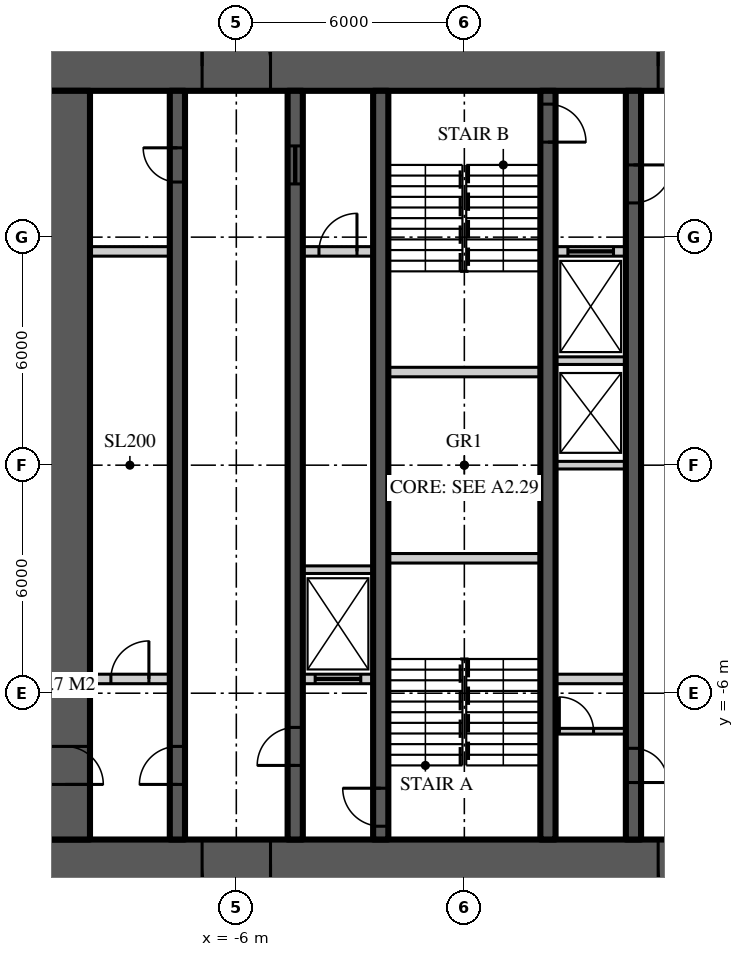
"""IFC4 building model, lengths in metres.
Left out: names, types, materials, properties, quantities, classifications, styles, units other than length and angle.
Written with IfcOpenShell. Run it as: python <this file> out.ifc"""

import sys

from ifc_helpers import new_model, si_unit, direction, frame, frame_2d, origin, place, context, subcontext, project, spatial, rectangle, extrude, element, fill, save


model = new_model("IFC4")
c1 = context("Model", 3, precision=1e-05, world=origin(), true_north=direction((0.0, 1.0)))
c2 = subcontext(c1, "Body", "Model", "MODEL_VIEW")
j1 = project(units=[si_unit("LENGTHUNIT", "METRE"), si_unit("PLANEANGLEUNIT", "RADIAN")], contexts=[c1])
p1 = place(None, origin())
s1 = spatial("IfcSite", under=j1, at=p1, CompositionType="ELEMENT")
p2 = place(p1, origin())
s2 = spatial("IfcBuilding", under=s1, at=p2, CompositionType="ELEMENT")
p3 = place(p2, frame((0.0, 0.0, 212.7)))
s3 = spatial("IfcBuildingStorey", under=s2, at=p3, CompositionType="ELEMENT", Elevation=212.7)
p4 = place(p3, frame((-11.15, 10.5, 0.0), z_axis=(0.0, 0.0, 1.0), x_axis=(1.0, 0.0, 0.0)))
e1 = element("IfcWall", 1, at=p4, inside=s3, PredefinedType="SHEAR", context=c2, shape_type="SweptSolid", body=[
    extrude(rectangle(XDim=22.3, YDim=1.3, at=frame_2d((11.15, 0.0))), origin(), (0.0, 0.0, 1.0), 3.9),
])
p5 = place(p4, frame((4.25, 0.0, 0.0)))
e2 = element("IfcOpeningElement", 2, at=p5, cuts=e1, PredefinedType="OPENING", context=c2, shape_type="SweptSolid", body=[
    extrude(rectangle(XDim=1.8, YDim=2.2, at=frame_2d((0.9, 1.1))), frame((0.0, 0.66, 0.0), z_axis=(0.0, -1.0, 0.0), x_axis=(1.0, 0.0, 0.0)), (0.0, 0.0, 1.0), 1.32),
])
p6 = place(p4, frame((16.25, 0.0, 0.0)))
e3 = element("IfcOpeningElement", 3, at=p6, cuts=e1, PredefinedType="OPENING", context=c2, shape_type="SweptSolid", body=[
    extrude(rectangle(XDim=1.8, YDim=2.2, at=frame_2d((0.9, 1.1))), frame((0.0, 0.66, 0.0), z_axis=(0.0, -1.0, 0.0), x_axis=(1.0, 0.0, 0.0)), (0.0, 0.0, 1.0), 1.32),
])
p7 = place(p3, frame((11.15, -10.5, 0.0), z_axis=(0.0, 0.0, 1.0), x_axis=(-1.0, 0.0, 0.0)))
e4 = element("IfcWall", 4, at=p7, inside=s3, PredefinedType="SHEAR", context=c2, shape_type="SweptSolid", body=[
    extrude(rectangle(XDim=22.3, YDim=1.3, at=frame_2d((11.15, 0.0))), origin(), (0.0, 0.0, 1.0), 3.9),
])
p8 = place(p7, frame((16.25, 0.0, 0.0)))
e5 = element("IfcOpeningElement", 5, at=p8, cuts=e4, PredefinedType="OPENING", context=c2, shape_type="SweptSolid", body=[
    extrude(rectangle(XDim=1.8, YDim=2.2, at=frame_2d((0.9, 1.1))), frame((0.0, 0.66, 0.0), z_axis=(0.0, -1.0, 0.0), x_axis=(1.0, 0.0, 0.0)), (0.0, 0.0, 1.0), 1.32),
])
p9 = place(p7, frame((4.25, 0.0, 0.0)))
e6 = element("IfcOpeningElement", 6, at=p9, cuts=e4, PredefinedType="OPENING", context=c2, shape_type="SweptSolid", body=[
    extrude(rectangle(XDim=1.8, YDim=2.2, at=frame_2d((0.9, 1.1))), frame((0.0, 0.66, 0.0), z_axis=(0.0, -1.0, 0.0), x_axis=(1.0, 0.0, 0.0)), (0.0, 0.0, 1.0), 1.32),
])
p10 = place(p3, frame((-10.5, 9.85, 0.0), z_axis=(0.0, 0.0, 1.0), x_axis=(0.0, -1.0, 0.0)))
e7 = element("IfcWall", 7, at=p10, inside=s3, PredefinedType="SHEAR", context=c2, shape_type="SweptSolid", body=[
    extrude(rectangle(XDim=19.7, YDim=1.3, at=frame_2d((9.85, 0.0))), origin(), (0.0, 0.0, 1.0), 3.9),
])
p11 = place(p10, frame((17.25, 0.0, 0.0)))
e8 = element("IfcOpeningElement", 8, at=p11, cuts=e7, PredefinedType="OPENING", context=c2, shape_type="SweptSolid", body=[
    extrude(rectangle(XDim=1.0, YDim=2.2, at=frame_2d((0.5, 1.1))), frame((0.0, 0.66, 0.0), z_axis=(0.0, -1.0, 0.0), x_axis=(1.0, 0.0, 0.0)), (0.0, 0.0, 1.0), 1.32),
])
p12 = place(p3, frame((-7.55, -9.85, 0.0), z_axis=(0.0, 0.0, 1.0), x_axis=(0.0, 1.0, 0.0)))
e9 = element("IfcWall", 9, at=p12, inside=s3, PredefinedType="SHEAR", context=c2, shape_type="SweptSolid", body=[
    extrude(rectangle(XDim=19.7, YDim=0.4, at=frame_2d((9.85, 0.0))), origin(), (0.0, 0.0, 1.0), 3.9),
])
p13 = place(p12, frame((1.45, 0.0, 0.0)))
e10 = element("IfcOpeningElement", 10, at=p13, cuts=e9, PredefinedType="OPENING", context=c2, shape_type="SweptSolid", body=[
    extrude(rectangle(XDim=1.0, YDim=2.2, at=frame_2d((0.5, 1.1))), frame((0.0, 0.21, 0.0), z_axis=(0.0, -1.0, 0.0), x_axis=(1.0, 0.0, 0.0)), (0.0, 0.0, 1.0), 0.42),
])
p14 = place(p12, frame((17.3, 0.0, 0.0)))
e11 = element("IfcOpeningElement", 11, at=p14, cuts=e9, PredefinedType="OPENING", context=c2, shape_type="SweptSolid", body=[
    extrude(rectangle(XDim=0.9, YDim=2.1, at=frame_2d((0.45, 1.05))), frame((0.0, 0.21, 0.0), z_axis=(0.0, -1.0, 0.0), x_axis=(1.0, 0.0, 0.0)), (0.0, 0.0, 1.0), 0.42),
])
p15 = place(p3, frame((-4.45, -9.85, 0.0), z_axis=(0.0, 0.0, 1.0), x_axis=(0.0, 1.0, 0.0)))
e12 = element("IfcWall", 12, at=p15, inside=s3, PredefinedType="SHEAR", context=c2, shape_type="SweptSolid", body=[
    extrude(rectangle(XDim=19.7, YDim=0.4, at=frame_2d((9.85, 0.0))), origin(), (0.0, 0.0, 1.0), 3.9),
])
p16 = place(p15, frame((1.95, 0.0, 0.0)))
e13 = element("IfcOpeningElement", 13, at=p16, cuts=e12, PredefinedType="OPENING", context=c2, shape_type="SweptSolid", body=[
    extrude(rectangle(XDim=1.0, YDim=2.2, at=frame_2d((0.5, 1.1))), frame((0.0, 0.21, 0.0), z_axis=(0.0, -1.0, 0.0), x_axis=(1.0, 0.0, 0.0)), (0.0, 0.0, 1.0), 0.42),
])
p17 = place(p15, frame((17.25, 0.0, 0.0)))
e14 = element("IfcOpeningElement", 14, at=p17, cuts=e12, PredefinedType="OPENING", context=c2, shape_type="SweptSolid", body=[
    extrude(rectangle(XDim=1.0, YDim=2.1, at=frame_2d((0.5, 1.05))), frame((0.0, 0.21, 0.0), z_axis=(0.0, -1.0, 0.0), x_axis=(1.0, 0.0, 0.0)), (0.0, 0.0, 1.0), 0.42),
])
p18 = place(p3, frame((4.45, 9.85, 0.0), z_axis=(0.0, 0.0, 1.0), x_axis=(0.0, -1.0, 0.0)))
e15 = element("IfcWall", 15, at=p18, inside=s3, PredefinedType="SHEAR", context=c2, shape_type="SweptSolid", body=[
    extrude(rectangle(XDim=19.7, YDim=0.4, at=frame_2d((9.85, 0.0))), origin(), (0.0, 0.0, 1.0), 3.9),
])
p19 = place(p18, frame((1.95, 0.0, 0.0)))
e16 = element("IfcOpeningElement", 16, at=p19, cuts=e15, PredefinedType="OPENING", context=c2, shape_type="SweptSolid", body=[
    extrude(rectangle(XDim=1.0, YDim=2.2, at=frame_2d((0.5, 1.1))), frame((0.0, 0.21, 0.0), z_axis=(0.0, -1.0, 0.0), x_axis=(1.0, 0.0, 0.0)), (0.0, 0.0, 1.0), 0.42),
])
p20 = place(p18, frame((17.3, 0.0, 0.0)))
e17 = element("IfcOpeningElement", 17, at=p20, cuts=e15, PredefinedType="OPENING", context=c2, shape_type="SweptSolid", body=[
    extrude(rectangle(XDim=0.9, YDim=2.1, at=frame_2d((0.45, 1.05))), frame((0.0, 0.21, 0.0), z_axis=(0.0, -1.0, 0.0), x_axis=(1.0, 0.0, 0.0)), (0.0, 0.0, 1.0), 0.42),
])
p21 = place(p3, frame((-2.2, -9.85, 0.0), z_axis=(0.0, 0.0, 1.0), x_axis=(0.0, 1.0, 0.0)))
e18 = element("IfcWall", 18, at=p21, inside=s3, PredefinedType="SHEAR", context=c2, shape_type="SweptSolid", body=[
    extrude(rectangle(XDim=19.7, YDim=0.4, at=frame_2d((9.85, 0.0))), origin(), (0.0, 0.0, 1.0), 3.9),
])
p22 = place(p21, frame((0.35, 0.0, 0.0)))
e19 = element("IfcOpeningElement", 19, at=p22, cuts=e18, PredefinedType="OPENING", context=c2, shape_type="SweptSolid", body=[
    extrude(rectangle(XDim=1.0, YDim=2.2, at=frame_2d((0.5, 1.1))), frame((0.0, 0.21, 0.0), z_axis=(0.0, -1.0, 0.0), x_axis=(1.0, 0.0, 0.0)), (0.0, 0.0, 1.0), 0.42),
])
p23 = place(p3, frame((2.2, 9.85, 0.0), z_axis=(0.0, 0.0, 1.0), x_axis=(0.0, -1.0, 0.0)))
e20 = element("IfcWall", 20, at=p23, inside=s3, PredefinedType="SHEAR", context=c2, shape_type="SweptSolid", body=[
    extrude(rectangle(XDim=19.7, YDim=0.4, at=frame_2d((9.85, 0.0))), origin(), (0.0, 0.0, 1.0), 3.9),
])
p24 = place(p23, frame((0.35, 0.0, 0.0)))
e21 = element("IfcOpeningElement", 21, at=p24, cuts=e20, PredefinedType="OPENING", context=c2, shape_type="SweptSolid", body=[
    extrude(rectangle(XDim=1.0, YDim=2.2, at=frame_2d((0.5, 1.1))), frame((0.0, 0.21, 0.0), z_axis=(0.0, -1.0, 0.0), x_axis=(1.0, 0.0, 0.0)), (0.0, 0.0, 1.0), 0.42),
])
p25 = place(p3, frame((-9.85, 5.625, 0.0), z_axis=(0.0, 0.0, 1.0), x_axis=(1.0, 0.0, 0.0)))
e22 = element("IfcWall", 22, at=p25, inside=s3, PredefinedType="SOLIDWALL", context=c2, shape_type="SweptSolid", body=[
    extrude(rectangle(XDim=2.1, YDim=0.25, at=frame_2d((1.05, 0.0))), origin(), (0.0, 0.0, 1.0), 3.7),
])
p26 = place(p3, frame((-4.25, 5.625, 0.0), z_axis=(0.0, 0.0, 1.0), x_axis=(1.0, 0.0, 0.0)))
e23 = element("IfcWall", 23, at=p26, inside=s3, PredefinedType="SOLIDWALL", context=c2, shape_type="SweptSolid", body=[
    extrude(rectangle(XDim=1.85, YDim=0.25, at=frame_2d((0.925, 0.0))), origin(), (0.0, 0.0, 1.0), 3.7),
])
p27 = place(p26, frame((0.425, 0.0, 0.0)))
e24 = element("IfcOpeningElement", 24, at=p27, cuts=e23, PredefinedType="OPENING", context=c2, shape_type="SweptSolid", body=[
    extrude(rectangle(XDim=1.0, YDim=2.2, at=frame_2d((0.5, 1.1))), frame((0.0, 0.135, 0.0), z_axis=(0.0, -1.0, 0.0), x_axis=(1.0, 0.0, 0.0)), (0.0, 0.0, 1.0), 0.27),
])
p28 = place(p3, frame((2.4, 5.625, 0.0), z_axis=(0.0, 0.0, 1.0), x_axis=(1.0, 0.0, 0.0)))
e25 = element("IfcWall", 25, at=p28, inside=s3, PredefinedType="SOLIDWALL", context=c2, shape_type="SweptSolid", body=[
    extrude(rectangle(XDim=1.85, YDim=0.25, at=frame_2d((0.925, 0.0))), origin(), (0.0, 0.0, 1.0), 3.7),
])
p29 = place(p28, frame((0.325, 0.0, 0.0)))
e26 = element("IfcOpeningElement", 26, at=p29, cuts=e25, PredefinedType="OPENING", context=c2, shape_type="SweptSolid", body=[
    extrude(rectangle(XDim=1.2, YDim=2.2, at=frame_2d((0.6, 1.1))), frame((0.0, 0.135, 0.0), z_axis=(0.0, -1.0, 0.0), x_axis=(1.0, 0.0, 0.0)), (0.0, 0.0, 1.0), 0.27),
])
p30 = place(p3, frame((-9.85, -5.625, 0.0), z_axis=(0.0, 0.0, 1.0), x_axis=(1.0, 0.0, 0.0)))
e27 = element("IfcWall", 27, at=p30, inside=s3, PredefinedType="SOLIDWALL", context=c2, shape_type="SweptSolid", body=[
    extrude(rectangle(XDim=2.1, YDim=0.25, at=frame_2d((1.05, 0.0))), origin(), (0.0, 0.0, 1.0), 3.7),
])
p31 = place(p30, frame((0.55, 0.0, 0.0)))
e28 = element("IfcOpeningElement", 28, at=p31, cuts=e27, PredefinedType="OPENING", context=c2, shape_type="SweptSolid", body=[
    extrude(rectangle(XDim=1.0, YDim=2.2, at=frame_2d((0.5, 1.1))), frame((0.0, 0.135, 0.0), z_axis=(0.0, -1.0, 0.0), x_axis=(1.0, 0.0, 0.0)), (0.0, 0.0, 1.0), 0.27),
])
p32 = place(p3, frame((-4.25, -5.625, 0.0), z_axis=(0.0, 0.0, 1.0), x_axis=(1.0, 0.0, 0.0)))
e29 = element("IfcWall", 29, at=p32, inside=s3, PredefinedType="SOLIDWALL", context=c2, shape_type="SweptSolid", body=[
    extrude(rectangle(XDim=1.85, YDim=0.25, at=frame_2d((0.925, 0.0))), origin(), (0.0, 0.0, 1.0), 3.7),
])
p33 = place(p32, frame((0.325, 0.0, 0.0)))
e30 = element("IfcOpeningElement", 30, at=p33, cuts=e29, PredefinedType="OPENING", context=c2, shape_type="SweptSolid", body=[
    extrude(rectangle(XDim=1.2, YDim=2.2, at=frame_2d((0.6, 1.1))), frame((0.0, 0.135, 0.0), z_axis=(0.0, -1.0, 0.0), x_axis=(1.0, 0.0, 0.0)), (0.0, 0.0, 1.0), 0.27),
])
p34 = place(p3, frame((2.4, -5.625, 0.0), z_axis=(0.0, 0.0, 1.0), x_axis=(1.0, 0.0, 0.0)))
e31 = element("IfcWall", 31, at=p34, inside=s3, PredefinedType="SOLIDWALL", context=c2, shape_type="SweptSolid", body=[
    extrude(rectangle(XDim=1.85, YDim=0.25, at=frame_2d((0.925, 0.0))), origin(), (0.0, 0.0, 1.0), 3.7),
])
for number, where, z_axis, x_axis in (
    (32, (-2.0, -2.45, 0.0), (0.0, 0.0, 1.0), (1.0, 0.0, 0.0)),
    (33, (-2.0, 2.45, 0.0), (0.0, 0.0, 1.0), (1.0, 0.0, 0.0)),
):
    element("IfcWall", number, at=place(p3, frame(where, z_axis=z_axis, x_axis=x_axis)), inside=s3, PredefinedType="SOLIDWALL", context=c2, shape_type="SweptSolid", body=[
        extrude(rectangle(XDim=4.0, YDim=0.25, at=frame_2d((2.0, 0.0))), origin(), (0.0, 0.0, 1.0), 3.7),
    ])
for number, where, z_axis, x_axis in (
    (34, (-4.25, -2.75, 0.0), (0.0, 0.0, 1.0), (1.0, 0.0, 0.0)),
    (35, (2.4, 0.0, 0.0), (0.0, 0.0, 1.0), (1.0, 0.0, 0.0)),
    (36, (2.4, 2.75, 0.0), (0.0, 0.0, 1.0), (1.0, 0.0, 0.0)),
):
    element("IfcWall", number, at=place(p3, frame(where, z_axis=z_axis, x_axis=x_axis)), inside=s3, PredefinedType="SOLIDWALL", context=c2, shape_type="SweptSolid", body=[
        extrude(rectangle(XDim=1.85, YDim=0.2, at=frame_2d((0.925, 0.0))), origin(), (0.0, 0.0, 1.0), 3.7),
    ])
p35 = place(p3, frame((2.4, -7.0, 0.0), z_axis=(0.0, 0.0, 1.0), x_axis=(1.0, 0.0, 0.0)))
e37 = element("IfcWall", 37, at=p35, inside=s3, PredefinedType="SOLIDWALL", context=c2, shape_type="SweptSolid", body=[
    extrude(rectangle(XDim=1.85, YDim=0.15, at=frame_2d((0.925, 0.0))), origin(), (0.0, 0.0, 1.0), 3.77),
])
p36 = place(p35, frame((0.1, 0.0, 0.0)))
e38 = element("IfcOpeningElement", 38, at=p36, cuts=e37, PredefinedType="OPENING", context=c2, shape_type="SweptSolid", body=[
    extrude(rectangle(XDim=0.9, YDim=2.1, at=frame_2d((0.45, 1.05))), frame((0.0, 0.085, 0.0), z_axis=(0.0, -1.0, 0.0), x_axis=(1.0, 0.0, 0.0)), (0.0, 0.0, 1.0), 0.17),
])
p37 = place(p5, origin())
e39 = element("IfcDoor", 39, at=p37, inside=s3, OperationType="DOUBLE_DOOR_DOUBLE_SWING", PredefinedType="DOOR", context=c2, shape_type="SweptSolid", body=[
    extrude(rectangle(XDim=1.8, YDim=2.2, at=frame_2d((0.9, 1.1))), frame((0.0, 0.025, 0.0), z_axis=(0.0, -1.0, 0.0), x_axis=(1.0, 0.0, 0.0)), (0.0, 0.0, 1.0), 0.05),
])
fill(e2, e39)
p38 = place(p8, origin())
e40 = element("IfcDoor", 40, at=p38, inside=s3, OperationType="DOUBLE_DOOR_DOUBLE_SWING", PredefinedType="DOOR", context=c2, shape_type="SweptSolid", body=[
    extrude(rectangle(XDim=1.8, YDim=2.2, at=frame_2d((0.9, 1.1))), frame((0.0, 0.025, 0.0), z_axis=(0.0, -1.0, 0.0), x_axis=(1.0, 0.0, 0.0)), (0.0, 0.0, 1.0), 0.05),
])
fill(e5, e40)
p39 = place(p6, origin())
e41 = element("IfcDoor", 41, at=p39, inside=s3, OperationType="DOUBLE_DOOR_DOUBLE_SWING", PredefinedType="DOOR", context=c2, shape_type="SweptSolid", body=[
    extrude(rectangle(XDim=1.8, YDim=2.2, at=frame_2d((0.9, 1.1))), frame((0.0, 0.025, 0.0), z_axis=(0.0, -1.0, 0.0), x_axis=(1.0, 0.0, 0.0)), (0.0, 0.0, 1.0), 0.05),
])
fill(e3, e41)
p40 = place(p9, origin())
e42 = element("IfcDoor", 42, at=p40, inside=s3, OperationType="DOUBLE_DOOR_DOUBLE_SWING", PredefinedType="DOOR", context=c2, shape_type="SweptSolid", body=[
    extrude(rectangle(XDim=1.8, YDim=2.2, at=frame_2d((0.9, 1.1))), frame((0.0, 0.025, 0.0), z_axis=(0.0, -1.0, 0.0), x_axis=(1.0, 0.0, 0.0)), (0.0, 0.0, 1.0), 0.05),
])
fill(e6, e42)
p41 = place(p13, origin())
e43 = element("IfcDoor", 43, at=p41, inside=s3, OperationType="SINGLE_SWING_LEFT", PredefinedType="DOOR", context=c2, shape_type="SweptSolid", body=[
    extrude(rectangle(XDim=1.0, YDim=2.2, at=frame_2d((0.5, 1.1))), frame((0.0, 0.025, 0.0), z_axis=(0.0, -1.0, 0.0), x_axis=(1.0, 0.0, 0.0)), (0.0, 0.0, 1.0), 0.05),
])
fill(e10, e43)
p42 = place(p11, origin())
e44 = element("IfcDoor", 44, at=p42, inside=s3, OperationType="SINGLE_SWING_RIGHT", PredefinedType="DOOR", context=c2, shape_type="SweptSolid", body=[
    extrude(rectangle(XDim=1.0, YDim=2.2, at=frame_2d((0.5, 1.1))), frame((0.0, 0.025, 0.0), z_axis=(0.0, -1.0, 0.0), x_axis=(1.0, 0.0, 0.0)), (0.0, 0.0, 1.0), 0.05),
])
fill(e8, e44)
p43 = place(p16, origin())
e45 = element("IfcDoor", 45, at=p43, inside=s3, OperationType="SINGLE_SWING_LEFT", PredefinedType="DOOR", context=c2, shape_type="SweptSolid", body=[
    extrude(rectangle(XDim=1.0, YDim=2.2, at=frame_2d((0.5, 1.1))), frame((0.0, 0.025, 0.0), z_axis=(0.0, -1.0, 0.0), x_axis=(1.0, 0.0, 0.0)), (0.0, 0.0, 1.0), 0.05),
])
fill(e13, e45)
p44 = place(p22, origin())
e46 = element("IfcDoor", 46, at=p44, inside=s3, OperationType="SINGLE_SWING_RIGHT", PredefinedType="DOOR", context=c2, shape_type="SweptSolid", body=[
    extrude(rectangle(XDim=1.0, YDim=2.2, at=frame_2d((0.5, 1.1))), frame((0.0, 0.025, 0.0), z_axis=(0.0, -1.0, 0.0), x_axis=(1.0, 0.0, 0.0)), (0.0, 0.0, 1.0), 0.05),
])
fill(e19, e46)
p45 = place(p19, origin())
e47 = element("IfcDoor", 47, at=p45, inside=s3, OperationType="SINGLE_SWING_LEFT", PredefinedType="DOOR", context=c2, shape_type="SweptSolid", body=[
    extrude(rectangle(XDim=1.0, YDim=2.2, at=frame_2d((0.5, 1.1))), frame((0.0, 0.025, 0.0), z_axis=(0.0, -1.0, 0.0), x_axis=(1.0, 0.0, 0.0)), (0.0, 0.0, 1.0), 0.05),
])
fill(e16, e47)
p46 = place(p24, origin())
e48 = element("IfcDoor", 48, at=p46, inside=s3, OperationType="SINGLE_SWING_RIGHT", PredefinedType="DOOR", context=c2, shape_type="SweptSolid", body=[
    extrude(rectangle(XDim=1.0, YDim=2.2, at=frame_2d((0.5, 1.1))), frame((0.0, 0.025, 0.0), z_axis=(0.0, -1.0, 0.0), x_axis=(1.0, 0.0, 0.0)), (0.0, 0.0, 1.0), 0.05),
])
fill(e21, e48)
p47 = place(p14, origin())
e49 = element("IfcDoor", 49, at=p47, inside=s3, OperationType="SINGLE_SWING_RIGHT", PredefinedType="DOOR", context=c2, shape_type="SweptSolid", body=[
    extrude(rectangle(XDim=0.9, YDim=2.1, at=frame_2d((0.45, 1.05))), frame((0.0, 0.025, 0.0), z_axis=(0.0, -1.0, 0.0), x_axis=(1.0, 0.0, 0.0)), (0.0, 0.0, 1.0), 0.05),
])
fill(e11, e49)
p48 = place(p17, origin())
e50 = element("IfcDoor", 50, at=p48, inside=s3, OperationType="SLIDING_TO_LEFT", PredefinedType="DOOR", context=c2, shape_type="SweptSolid", body=[
    extrude(rectangle(XDim=1.0, YDim=2.1, at=frame_2d((0.5, 1.05))), frame((0.0, 0.025, 0.0), z_axis=(0.0, -1.0, 0.0), x_axis=(1.0, 0.0, 0.0)), (0.0, 0.0, 1.0), 0.05),
])
fill(e14, e50)
p49 = place(p20, origin())
e51 = element("IfcDoor", 51, at=p49, inside=s3, OperationType="SINGLE_SWING_RIGHT", PredefinedType="DOOR", context=c2, shape_type="SweptSolid", body=[
    extrude(rectangle(XDim=0.9, YDim=2.1, at=frame_2d((0.45, 1.05))), frame((0.0, 0.025, 0.0), z_axis=(0.0, -1.0, 0.0), x_axis=(1.0, 0.0, 0.0)), (0.0, 0.0, 1.0), 0.05),
])
fill(e17, e51)
p50 = place(p33, origin())
e52 = element("IfcDoor", 52, at=p50, inside=s3, OperationType="SLIDING_TO_LEFT", PredefinedType="DOOR", context=c2, shape_type="SweptSolid", body=[
    extrude(rectangle(XDim=1.2, YDim=2.2, at=frame_2d((0.6, 1.1))), frame((0.0, 0.025, 0.0), z_axis=(0.0, -1.0, 0.0), x_axis=(1.0, 0.0, 0.0)), (0.0, 0.0, 1.0), 0.05),
])
fill(e30, e52)
p51 = place(p29, origin())
e53 = element("IfcDoor", 53, at=p51, inside=s3, OperationType="SLIDING_TO_LEFT", PredefinedType="DOOR", context=c2, shape_type="SweptSolid", body=[
    extrude(rectangle(XDim=1.2, YDim=2.2, at=frame_2d((0.6, 1.1))), frame((0.0, 0.025, 0.0), z_axis=(0.0, -1.0, 0.0), x_axis=(1.0, 0.0, 0.0)), (0.0, 0.0, 1.0), 0.05),
])
fill(e26, e53)
p52 = place(p31, origin())
e54 = element("IfcDoor", 54, at=p52, inside=s3, OperationType="SINGLE_SWING_RIGHT", PredefinedType="DOOR", context=c2, shape_type="SweptSolid", body=[
    extrude(rectangle(XDim=1.0, YDim=2.2, at=frame_2d((0.5, 1.1))), frame((0.0, 0.025, 0.0), z_axis=(0.0, -1.0, 0.0), x_axis=(1.0, 0.0, 0.0)), (0.0, 0.0, 1.0), 0.05),
])
fill(e28, e54)
p53 = place(p27, origin())
e55 = element("IfcDoor", 55, at=p53, inside=s3, OperationType="SINGLE_SWING_RIGHT", PredefinedType="DOOR", context=c2, shape_type="SweptSolid", body=[
    extrude(rectangle(XDim=1.0, YDim=2.2, at=frame_2d((0.5, 1.1))), frame((0.0, 0.025, 0.0), z_axis=(0.0, -1.0, 0.0), x_axis=(1.0, 0.0, 0.0)), (0.0, 0.0, 1.0), 0.05),
])
fill(e24, e55)
p54 = place(p36, origin())
e56 = element("IfcDoor", 56, at=p54, inside=s3, OperationType="SINGLE_SWING_LEFT", PredefinedType="DOOR", context=c2, shape_type="SweptSolid", body=[
    extrude(rectangle(XDim=0.9, YDim=2.1, at=frame_2d((0.45, 1.05))), frame((0.0, 0.025, 0.0), z_axis=(0.0, -1.0, 0.0), x_axis=(1.0, 0.0, 0.0)), (0.0, 0.0, 1.0), 0.05),
])
fill(e38, e56)
save(model, sys.argv[1])
